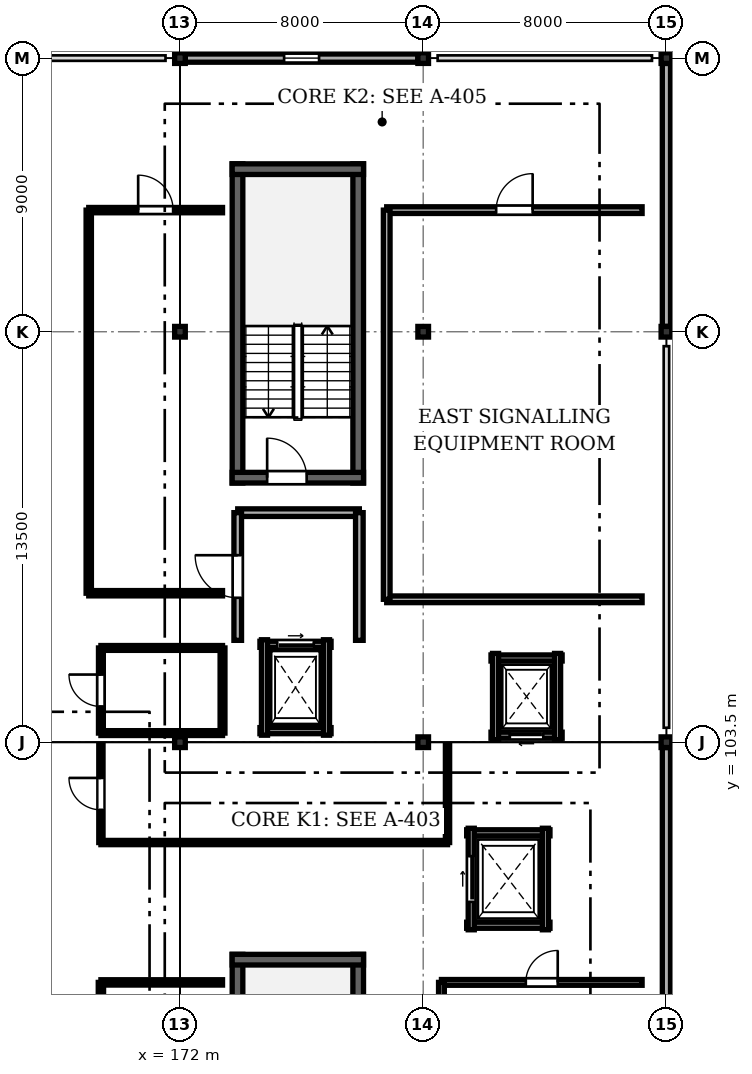
"""IFC4 building model, lengths in metres.
Left out: names, types, materials, properties, quantities, classifications, styles, units other than length and angle.
Written with IfcOpenShell. Run it as: python <this file> out.ifc"""

import sys

from ifc_helpers import new_model, si_unit, direction, frame, frame_2d, origin, origin_2d, place, context, subcontext, project, spatial, rectangle, i_section, extrude, element, fill, save


model = new_model("IFC4")
c1 = context("Model", 3, precision=1e-05, world=origin(), true_north=direction((0.0, 1.0)))
c2 = subcontext(c1, "Body", "Model", "MODEL_VIEW")
j1 = project(units=[si_unit("LENGTHUNIT", "METRE"), si_unit("PLANEANGLEUNIT", "RADIAN")], contexts=[c1])
p1 = place(None, origin())
s1 = spatial("IfcSite", under=j1, at=p1, CompositionType="ELEMENT")
p2 = place(p1, origin())
s2 = spatial("IfcBuilding", under=s1, at=p2, CompositionType="ELEMENT")
p3 = place(p2, frame((0.0, 0.0, 17.6)))
s3 = spatial("IfcBuildingStorey", under=s2, at=p3, CompositionType="ELEMENT", Elevation=17.6)
for number, where, z_axis, x_axis in (
    (1, (172.0, 103.5, 0.0), (0.0, 0.0, 1.0), (1.0, 0.0, 0.0)),
    (2, (172.0, 117.0, 0.0), (0.0, 0.0, 1.0), (1.0, 0.0, 0.0)),
    (3, (172.0, 126.0, 0.0), (0.0, 0.0, 1.0), (1.0, 0.0, 0.0)),
    (4, (180.0, 103.5, 0.0), (0.0, 0.0, 1.0), (1.0, 0.0, 0.0)),
    (5, (180.0, 117.0, 0.0), (0.0, 0.0, 1.0), (1.0, 0.0, 0.0)),
    (6, (180.0, 126.0, 0.0), (0.0, 0.0, 1.0), (1.0, 0.0, 0.0)),
    (7, (188.0, 103.5, 0.0), (0.0, 0.0, 1.0), (1.0, 0.0, 0.0)),
    (8, (188.0, 117.0, 0.0), (0.0, 0.0, 1.0), (1.0, 0.0, 0.0)),
    (9, (188.0, 126.0, 0.0), (0.0, 0.0, 1.0), (1.0, 0.0, 0.0)),
):
    element("IfcColumn", number, at=place(p3, frame(where, z_axis=z_axis, x_axis=x_axis)), inside=s3, PredefinedType="COLUMN", context=c2, shape_type="SweptSolid", body=[
        extrude(i_section(OverallWidth=0.35, OverallDepth=0.35, WebThickness=0.012, FlangeThickness=0.019, FilletRadius=0.02, at=origin_2d()), origin(), (0.0, 0.0, 1.0), 3.2),
    ])
p4 = place(p3, frame((172.175, 126.0, 0.0), z_axis=(0.0, 0.0, 1.0), x_axis=(1.0, 0.0, 0.0)))
e10 = element("IfcWall", 10, at=p4, inside=s3, PredefinedType="SOLIDWALL", context=c2, shape_type="SweptSolid", body=[
    extrude(rectangle(XDim=7.65, YDim=0.27, at=frame_2d((3.825, 0.0))), origin(), (0.0, 0.0, 1.0), 2.495),
])
p5 = place(p4, frame((3.25, 0.0, 0.9)))
e11 = element("IfcOpeningElement", 11, at=p5, cuts=e10, PredefinedType="OPENING", context=c2, shape_type="SweptSolid", body=[
    extrude(rectangle(XDim=1.15, YDim=1.45, at=frame_2d((0.575, 0.725))), frame((0.0, 0.145, 0.0), z_axis=(0.0, -1.0, 0.0), x_axis=(1.0, 0.0, 0.0)), (0.0, 0.0, 1.0), 0.29),
])
for number, where, z_axis, x_axis in (
    (12, (188.0, 103.325, 0.0), (0.0, 0.0, 1.0), (0.0, -1.0, 0.0)),
    (13, (188.0, 125.825, 0.0), (0.0, 0.0, 1.0), (0.0, -1.0, 0.0)),
):
    element("IfcWall", number, at=place(p3, frame(where, z_axis=z_axis, x_axis=x_axis)), inside=s3, PredefinedType="SOLIDWALL", context=c2, shape_type="SweptSolid", body=[
        extrude(rectangle(XDim=8.65, YDim=0.27, at=frame_2d((4.325, 0.0))), origin(), (0.0, 0.0, 1.0), 2.375),
    ])
for number, where, z_axis, x_axis in (
    (14, (177.863, 86.025, 0.0), (0.0, 0.0, 1.0), (0.0, 1.0, 0.0)),
    (15, (173.893, 96.522, 0.0), (0.0, 0.0, 1.0), (0.0, -1.0, 0.0)),
):
    element("IfcWall", number, at=place(p3, frame(where, z_axis=z_axis, x_axis=x_axis)), inside=s3, PredefinedType="SHEAR", context=c2, shape_type="SweptSolid", body=[
        extrude(rectangle(XDim=10.498, YDim=0.35, at=frame_2d((5.249, 0.0))), origin(), (0.0, 0.0, 1.0), 2.98),
    ])
p6 = place(p3, frame((178.038, 96.347, 0.0), z_axis=(0.0, 0.0, 1.0), x_axis=(-1.0, 0.0, 0.0)))
e16 = element("IfcWall", 16, at=p6, inside=s3, PredefinedType="SHEAR", context=c2, shape_type="SweptSolid", body=[
    extrude(rectangle(XDim=4.32, YDim=0.35, at=frame_2d((2.16, 0.0))), origin(), (0.0, 0.0, 1.0), 2.98),
])
for number, where, z_axis, x_axis in (
    (17, (177.863, 112.025, 0.0), (0.0, 0.0, 1.0), (0.0, 1.0, 0.0)),
    (18, (173.893, 122.522, 0.0), (0.0, 0.0, 1.0), (0.0, -1.0, 0.0)),
):
    element("IfcWall", number, at=place(p3, frame(where, z_axis=z_axis, x_axis=x_axis)), inside=s3, PredefinedType="SHEAR", context=c2, shape_type="SweptSolid", body=[
        extrude(rectangle(XDim=10.498, YDim=0.35, at=frame_2d((5.249, 0.0))), origin(), (0.0, 0.0, 1.0), 2.98),
    ])
p7 = place(p3, frame((178.038, 122.347, 0.0), z_axis=(0.0, 0.0, 1.0), x_axis=(-1.0, 0.0, 0.0)))
e19 = element("IfcWall", 19, at=p7, inside=s3, PredefinedType="SHEAR", context=c2, shape_type="SweptSolid", body=[
    extrude(rectangle(XDim=4.32, YDim=0.35, at=frame_2d((2.16, 0.0))), origin(), (0.0, 0.0, 1.0), 2.98),
])
p8 = place(p3, frame((173.718, 112.2, 0.0), z_axis=(0.0, 0.0, 1.0), x_axis=(1.0, 0.0, 0.0)))
e20 = element("IfcWall", 20, at=p8, inside=s3, PredefinedType="SHEAR", context=c2, shape_type="SweptSolid", body=[
    extrude(rectangle(XDim=4.32, YDim=0.35, at=frame_2d((2.16, 0.0))), origin(), (0.0, 0.0, 1.0), 2.98),
])
p9 = place(p8, frame((1.15, 0.0, 0.0)))
e21 = element("IfcOpeningElement", 21, at=p9, cuts=e20, PredefinedType="OPENING", context=c2, shape_type="SweptSolid", body=[
    extrude(rectangle(XDim=1.3, YDim=2.1, at=frame_2d((0.65, 1.05))), frame((0.0, 0.185, 0.0), z_axis=(0.0, -1.0, 0.0), x_axis=(1.0, 0.0, 0.0)), (0.0, 0.0, 1.0), 0.37),
])
p10 = place(p3, frame((174.63, 103.88, 0.0), z_axis=(0.0, 0.0, 1.0), x_axis=(1.0, 0.0, 0.0)))
e22 = element("IfcWall", 22, at=p10, inside=s3, PredefinedType="SOLIDWALL", context=c2, shape_type="SweptSolid", body=[
    extrude(rectangle(XDim=2.34, YDim=0.2, at=frame_2d((1.17, 0.0))), origin(), (0.0, 0.0, 1.0), 2.515),
])
p11 = place(p3, frame((176.97, 106.72, 0.0), z_axis=(0.0, 0.0, 1.0), x_axis=(-1.0, 0.0, 0.0)))
e23 = element("IfcWall", 23, at=p11, inside=s3, PredefinedType="SOLIDWALL", context=c2, shape_type="SweptSolid", body=[
    extrude(rectangle(XDim=2.34, YDim=0.2, at=frame_2d((1.17, 0.0))), origin(), (0.0, 0.0, 1.0), 2.955),
])
p12 = place(p11, frame((0.57, 0.0, 0.0)))
e24 = element("IfcOpeningElement", 24, at=p12, cuts=e23, PredefinedType="OPENING", context=c2, shape_type="SweptSolid", body=[
    extrude(rectangle(XDim=1.2, YDim=2.15, at=frame_2d((0.6, 1.075))), frame((0.0, 0.11, 0.0), z_axis=(0.0, -1.0, 0.0), x_axis=(1.0, 0.0, 0.0)), (0.0, 0.0, 1.0), 0.22),
])
for number, where, z_axis, x_axis in (
    (25, (174.78, 106.87, 0.0), (0.0, 0.0, 1.0), (0.0, -1.0, 0.0)),
    (26, (176.82, 103.73, 0.0), (0.0, 0.0, 1.0), (0.0, 1.0, 0.0)),
):
    element("IfcWall", number, at=place(p3, frame(where, z_axis=z_axis, x_axis=x_axis)), inside=s3, PredefinedType="SOLIDWALL", context=c2, shape_type="SweptSolid", body=[
        extrude(rectangle(XDim=3.14, YDim=0.2, at=frame_2d((1.57, 0.0))), origin(), (0.0, 0.0, 1.0), 2.515),
    ])
p13 = place(p3, frame((182.23, 103.73, 0.0), z_axis=(0.0, 0.0, 1.0), x_axis=(1.0, 0.0, 0.0)))
e27 = element("IfcWall", 27, at=p13, inside=s3, PredefinedType="SOLIDWALL", context=c2, shape_type="SweptSolid", body=[
    extrude(rectangle(XDim=2.34, YDim=0.2, at=frame_2d((1.17, 0.0))), origin(), (0.0, 0.0, 1.0), 2.515),
])
p14 = place(p13, frame((0.62, 0.0, 0.0)))
e28 = element("IfcOpeningElement", 28, at=p14, cuts=e27, PredefinedType="OPENING", context=c2, shape_type="SweptSolid", body=[
    extrude(rectangle(XDim=1.1, YDim=2.15, at=frame_2d((0.55, 1.075))), frame((0.0, 0.11, 0.0), z_axis=(0.0, -1.0, 0.0), x_axis=(1.0, 0.0, 0.0)), (0.0, 0.0, 1.0), 0.22),
])
p15 = place(p3, frame((184.57, 106.27, 0.0), z_axis=(0.0, 0.0, 1.0), x_axis=(-1.0, 0.0, 0.0)))
e29 = element("IfcWall", 29, at=p15, inside=s3, PredefinedType="SOLIDWALL", context=c2, shape_type="SweptSolid", body=[
    extrude(rectangle(XDim=2.34, YDim=0.2, at=frame_2d((1.17, 0.0))), origin(), (0.0, 0.0, 1.0), 2.955),
])
for number, where, z_axis, x_axis in (
    (30, (182.38, 106.42, 0.0), (0.0, 0.0, 1.0), (0.0, -1.0, 0.0)),
    (31, (184.42, 103.58, 0.0), (0.0, 0.0, 1.0), (0.0, 1.0, 0.0)),
):
    element("IfcWall", number, at=place(p3, frame(where, z_axis=z_axis, x_axis=x_axis)), inside=s3, PredefinedType="SOLIDWALL", context=c2, shape_type="SweptSolid", body=[
        extrude(rectangle(XDim=2.84, YDim=0.2, at=frame_2d((1.42, 0.0))), origin(), (0.0, 0.0, 1.0), 2.515),
    ])
for number, where, z_axis, x_axis in (
    (32, (181.43, 97.48, 0.0), (0.0, 0.0, 1.0), (1.0, 0.0, 0.0)),
    (33, (184.17, 100.52, 0.0), (0.0, 0.0, 1.0), (-1.0, 0.0, 0.0)),
):
    element("IfcWall", number, at=place(p3, frame(where, z_axis=z_axis, x_axis=x_axis)), inside=s3, PredefinedType="SOLIDWALL", context=c2, shape_type="SweptSolid", body=[
        extrude(rectangle(XDim=2.74, YDim=0.2, at=frame_2d((1.37, 0.0))), origin(), (0.0, 0.0, 1.0), 2.955),
    ])
p16 = place(p3, frame((181.58, 100.67, 0.0), z_axis=(0.0, 0.0, 1.0), x_axis=(0.0, -1.0, 0.0)))
e34 = element("IfcWall", 34, at=p16, inside=s3, PredefinedType="SOLIDWALL", context=c2, shape_type="SweptSolid", body=[
    extrude(rectangle(XDim=3.34, YDim=0.2, at=frame_2d((1.67, 0.0))), origin(), (0.0, 0.0, 1.0), 2.955),
])
p17 = place(p16, frame((0.92, 0.0, 0.0)))
e35 = element("IfcOpeningElement", 35, at=p17, cuts=e34, PredefinedType="OPENING", context=c2, shape_type="SweptSolid", body=[
    extrude(rectangle(XDim=1.5, YDim=2.2, at=frame_2d((0.75, 1.1))), frame((0.0, 0.11, 0.0), z_axis=(0.0, -1.0, 0.0), x_axis=(1.0, 0.0, 0.0)), (0.0, 0.0, 1.0), 0.22),
])
p18 = place(p3, frame((184.02, 97.33, 0.0), z_axis=(0.0, 0.0, 1.0), x_axis=(0.0, 1.0, 0.0)))
e36 = element("IfcWall", 36, at=p18, inside=s3, PredefinedType="SOLIDWALL", context=c2, shape_type="SweptSolid", body=[
    extrude(rectangle(XDim=3.34, YDim=0.2, at=frame_2d((1.67, 0.0))), origin(), (0.0, 0.0, 1.0), 2.955),
])
p19 = place(p3, frame((180.8, 100.2, 0.0), z_axis=(0.0, 0.0, 1.0), x_axis=(-1.0, 0.0, 0.0)))
e37 = element("IfcWall", 37, at=p19, inside=s3, PredefinedType="PARTITIONING", context=c2, shape_type="SweptSolid", body=[
    extrude(rectangle(XDim=11.4, YDim=0.14, at=frame_2d((5.7, 0.0))), origin(), (0.0, 0.0, 1.0), 2.565),
])
p20 = place(p3, frame((169.4, 100.2, 0.0), z_axis=(0.0, 0.0, 1.0), x_axis=(0.0, 1.0, 0.0)))
e38 = element("IfcWall", 38, at=p20, inside=s3, PredefinedType="PARTITIONING", context=c2, shape_type="SweptSolid", body=[
    extrude(rectangle(XDim=3.2, YDim=0.14, at=frame_2d((1.6, 0.0))), origin(), (0.0, 0.0, 1.0), 2.515),
])
p21 = place(p20, frame((1.075, 0.0, 0.0)))
e39 = element("IfcOpeningElement", 39, at=p21, cuts=e38, PredefinedType="OPENING", context=c2, shape_type="SweptSolid", body=[
    extrude(rectangle(XDim=1.05, YDim=2.1, at=frame_2d((0.525, 1.05))), frame((0.0, 0.08, 0.0), z_axis=(0.0, -1.0, 0.0), x_axis=(1.0, 0.0, 0.0)), (0.0, 0.0, 1.0), 0.16),
])
p22 = place(p3, frame((180.8, 103.4, 0.0), z_axis=(0.0, 0.0, 1.0), x_axis=(0.0, -1.0, 0.0)))
e40 = element("IfcWall", 40, at=p22, inside=s3, PredefinedType="PARTITIONING", context=c2, shape_type="SweptSolid", body=[
    extrude(rectangle(XDim=3.2, YDim=0.14, at=frame_2d((1.6, 0.0))), origin(), (0.0, 0.0, 1.0), 2.355),
])
p23 = place(p3, frame((180.6, 95.6, 0.0), z_axis=(0.0, 0.0, 1.0), x_axis=(1.0, 0.0, 0.0)))
e41 = element("IfcWall", 41, at=p23, inside=s3, PredefinedType="PARTITIONING", context=c2, shape_type="SweptSolid", body=[
    extrude(rectangle(XDim=6.6, YDim=0.19, at=frame_2d((3.3, 0.0))), origin(), (0.0, 0.0, 1.0), 2.495),
])
p24 = place(p23, frame((2.775, 0.0, 0.0)))
e42 = element("IfcOpeningElement", 42, at=p24, cuts=e41, PredefinedType="OPENING", context=c2, shape_type="SweptSolid", body=[
    extrude(rectangle(XDim=1.05, YDim=2.1, at=frame_2d((0.525, 1.05))), frame((0.0, 0.105, 0.0), z_axis=(0.0, -1.0, 0.0), x_axis=(1.0, 0.0, 0.0)), (0.0, 0.0, 1.0), 0.21),
])
p25 = place(p3, frame((180.6, 86.4, 0.0), z_axis=(0.0, 0.0, 1.0), x_axis=(0.0, 1.0, 0.0)))
e43 = element("IfcWall", 43, at=p25, inside=s3, PredefinedType="PARTITIONING", context=c2, shape_type="SweptSolid", body=[
    extrude(rectangle(XDim=9.2, YDim=0.19, at=frame_2d((4.6, 0.0))), origin(), (0.0, 0.0, 1.0), 2.515),
])
p26 = place(p3, frame((169.4, 95.6, 0.0), z_axis=(0.0, 0.0, 1.0), x_axis=(1.0, 0.0, 0.0)))
e44 = element("IfcWall", 44, at=p26, inside=s3, PredefinedType="PARTITIONING", context=c2, shape_type="SweptSolid", body=[
    extrude(rectangle(XDim=4.0, YDim=0.175, at=frame_2d((2.0, 0.0))), origin(), (0.0, 0.0, 1.0), 2.565),
])
p27 = place(p3, frame((169.4, 84.4, 0.0), z_axis=(0.0, 0.0, 1.0), x_axis=(0.0, 1.0, 0.0)))
e45 = element("IfcWall", 45, at=p27, inside=s3, PredefinedType="PARTITIONING", context=c2, shape_type="SweptSolid", body=[
    extrude(rectangle(XDim=11.2, YDim=0.175, at=frame_2d((5.6, 0.0))), origin(), (0.0, 0.0, 1.0), 2.515),
])
p28 = place(p27, frame((5.075, 0.0, 0.0)))
e46 = element("IfcOpeningElement", 46, at=p28, cuts=e45, PredefinedType="OPENING", context=c2, shape_type="SweptSolid", body=[
    extrude(rectangle(XDim=1.05, YDim=2.1, at=frame_2d((0.525, 1.05))), frame((0.0, 0.097, 0.0), z_axis=(0.0, -1.0, 0.0), x_axis=(1.0, 0.0, 0.0)), (0.0, 0.0, 1.0), 0.195),
])
for number, where, z_axis, x_axis in (
    (47, (173.4, 103.8, 0.0), (0.0, 0.0, 1.0), (-1.0, 0.0, 0.0)),
    (48, (169.4, 106.6, 0.0), (0.0, 0.0, 1.0), (1.0, 0.0, 0.0)),
):
    element("IfcWall", number, at=place(p3, frame(where, z_axis=z_axis, x_axis=x_axis)), inside=s3, PredefinedType="PARTITIONING", context=c2, shape_type="SweptSolid", body=[
        extrude(rectangle(XDim=4.0, YDim=0.16, at=frame_2d((2.0, 0.0))), origin(), (0.0, 0.0, 1.0), 2.355),
    ])
p29 = place(p3, frame((169.4, 103.8, 0.0), z_axis=(0.0, 0.0, 1.0), x_axis=(0.0, 1.0, 0.0)))
e49 = element("IfcWall", 49, at=p29, inside=s3, PredefinedType="PARTITIONING", context=c2, shape_type="SweptSolid", body=[
    extrude(rectangle(XDim=2.8, YDim=0.16, at=frame_2d((1.4, 0.0))), origin(), (0.0, 0.0, 1.0), 2.515),
])
p30 = place(p29, frame((0.875, 0.0, 0.0)))
e50 = element("IfcOpeningElement", 50, at=p30, cuts=e49, PredefinedType="OPENING", context=c2, shape_type="SweptSolid", body=[
    extrude(rectangle(XDim=1.05, YDim=2.1, at=frame_2d((0.525, 1.05))), frame((0.0, 0.09, 0.0), z_axis=(0.0, -1.0, 0.0), x_axis=(1.0, 0.0, 0.0)), (0.0, 0.0, 1.0), 0.18),
])
p31 = place(p3, frame((173.4, 106.6, 0.0), z_axis=(0.0, 0.0, 1.0), x_axis=(0.0, -1.0, 0.0)))
e51 = element("IfcWall", 51, at=p31, inside=s3, PredefinedType="PARTITIONING", context=c2, shape_type="SweptSolid", body=[
    extrude(rectangle(XDim=2.8, YDim=0.16, at=frame_2d((1.4, 0.0))), origin(), (0.0, 0.0, 1.0), 2.515),
])
p32 = place(p3, frame((187.2, 108.2, 0.0), z_axis=(0.0, 0.0, 1.0), x_axis=(-1.0, 0.0, 0.0)))
e52 = element("IfcWall", 52, at=p32, inside=s3, PredefinedType="SOLIDWALL", context=c2, shape_type="SweptSolid", body=[
    extrude(rectangle(XDim=8.4, YDim=0.22, at=frame_2d((4.2, 0.0))), origin(), (0.0, 0.0, 1.0), 2.355),
])
p33 = place(p3, frame((178.8, 121.0, 0.0), z_axis=(0.0, 0.0, 1.0), x_axis=(1.0, 0.0, 0.0)))
e53 = element("IfcWall", 53, at=p33, inside=s3, PredefinedType="SOLIDWALL", context=c2, shape_type="SweptSolid", body=[
    extrude(rectangle(XDim=8.4, YDim=0.22, at=frame_2d((4.2, 0.0))), origin(), (0.0, 0.0, 1.0), 2.495),
])
p34 = place(p33, frame((3.6, 0.0, 0.0)))
e54 = element("IfcOpeningElement", 54, at=p34, cuts=e53, PredefinedType="OPENING", context=c2, shape_type="SweptSolid", body=[
    extrude(rectangle(XDim=1.2, YDim=2.1, at=frame_2d((0.6, 1.05))), frame((0.0, 0.12, 0.0), z_axis=(0.0, -1.0, 0.0), x_axis=(1.0, 0.0, 0.0)), (0.0, 0.0, 1.0), 0.24),
])
p35 = place(p3, frame((178.8, 108.2, 0.0), z_axis=(0.0, 0.0, 1.0), x_axis=(0.0, 1.0, 0.0)))
e55 = element("IfcWall", 55, at=p35, inside=s3, PredefinedType="SOLIDWALL", context=c2, shape_type="SweptSolid", body=[
    extrude(rectangle(XDim=12.8, YDim=0.22, at=frame_2d((6.4, 0.0))), origin(), (0.0, 0.0, 1.0), 2.955),
])
p36 = place(p3, frame((173.4, 108.4, 0.0), z_axis=(0.0, 0.0, 1.0), x_axis=(-1.0, 0.0, 0.0)))
e56 = element("IfcWall", 56, at=p36, inside=s3, PredefinedType="PARTITIONING", context=c2, shape_type="SweptSolid", body=[
    extrude(rectangle(XDim=4.4, YDim=0.175, at=frame_2d((2.2, 0.0))), origin(), (0.0, 0.0, 1.0), 2.355),
])
p37 = place(p3, frame((169.0, 121.0, 0.0), z_axis=(0.0, 0.0, 1.0), x_axis=(1.0, 0.0, 0.0)))
e57 = element("IfcWall", 57, at=p37, inside=s3, PredefinedType="PARTITIONING", context=c2, shape_type="SweptSolid", body=[
    extrude(rectangle(XDim=4.4, YDim=0.175, at=frame_2d((2.2, 0.0))), origin(), (0.0, 0.0, 1.0), 2.565),
])
p38 = place(p37, frame((1.625, 0.0, 0.0)))
e58 = element("IfcOpeningElement", 58, at=p38, cuts=e57, PredefinedType="OPENING", context=c2, shape_type="SweptSolid", body=[
    extrude(rectangle(XDim=1.15, YDim=2.1, at=frame_2d((0.575, 1.05))), frame((0.0, 0.097, 0.0), z_axis=(0.0, -1.0, 0.0), x_axis=(1.0, 0.0, 0.0)), (0.0, 0.0, 1.0), 0.195),
])
p39 = place(p3, frame((169.0, 108.4, 0.0), z_axis=(0.0, 0.0, 1.0), x_axis=(0.0, 1.0, 0.0)))
e59 = element("IfcWall", 59, at=p39, inside=s3, PredefinedType="PARTITIONING", context=c2, shape_type="SweptSolid", body=[
    extrude(rectangle(XDim=12.6, YDim=0.175, at=frame_2d((6.3, 0.0))), origin(), (0.0, 0.0, 1.0), 2.515),
])
p40 = place(p3, frame((173.9, 111.05, 0.0), z_axis=(0.0, 0.0, 1.0), x_axis=(1.0, 0.0, 0.0)))
e60 = element("IfcWall", 60, at=p40, inside=s3, PredefinedType="SOLIDWALL", context=c2, shape_type="SweptSolid", body=[
    extrude(rectangle(XDim=4.0, YDim=0.25, at=frame_2d((2.0, 0.0))), origin(), (0.0, 0.0, 1.0), 2.955),
])
p41 = place(p3, frame((173.9, 106.85, 0.0), z_axis=(0.0, 0.0, 1.0), x_axis=(0.0, 1.0, 0.0)))
e61 = element("IfcWall", 61, at=p41, inside=s3, PredefinedType="SOLIDWALL", context=c2, shape_type="SweptSolid", body=[
    extrude(rectangle(XDim=4.2, YDim=0.25, at=frame_2d((2.1, 0.0))), origin(), (0.0, 0.0, 1.0), 2.955),
])
p42 = place(p41, frame((1.4, 0.0, 0.0)))
e62 = element("IfcOpeningElement", 62, at=p42, cuts=e61, PredefinedType="OPENING", context=c2, shape_type="SweptSolid", body=[
    extrude(rectangle(XDim=1.4, YDim=2.1, at=frame_2d((0.7, 1.05))), frame((0.0, 0.135, 0.0), z_axis=(0.0, -1.0, 0.0), x_axis=(1.0, 0.0, 0.0)), (0.0, 0.0, 1.0), 0.27),
])
p43 = place(p3, frame((177.9, 111.05, 0.0), z_axis=(0.0, 0.0, 1.0), x_axis=(0.0, -1.0, 0.0)))
e63 = element("IfcWall", 63, at=p43, inside=s3, PredefinedType="SOLIDWALL", context=c2, shape_type="SweptSolid", body=[
    extrude(rectangle(XDim=4.2, YDim=0.25, at=frame_2d((2.1, 0.0))), origin(), (0.0, 0.0, 1.0), 2.955),
])
p44 = place(p5, origin())
e64 = element("IfcWindow", 64, at=p44, inside=s3, PartitioningType="SINGLE_PANEL", PredefinedType="WINDOW", context=c2, shape_type="SweptSolid", body=[
    extrude(rectangle(XDim=1.15, YDim=1.45, at=frame_2d((0.575, 0.725))), frame((0.0, 0.03, 0.0), z_axis=(0.0, -1.0, 0.0), x_axis=(1.0, 0.0, 0.0)), (0.0, 0.0, 1.0), 0.06),
])
fill(e11, e64)
p45 = place(p9, origin())
e65 = element("IfcDoor", 65, at=p45, inside=s3, OperationType="SINGLE_SWING_LEFT", PredefinedType="DOOR", context=c2, shape_type="SweptSolid", body=[
    extrude(rectangle(XDim=1.3, YDim=2.1, at=frame_2d((0.65, 1.05))), frame((0.0, 0.025, 0.0), z_axis=(0.0, -1.0, 0.0), x_axis=(1.0, 0.0, 0.0)), (0.0, 0.0, 1.0), 0.05),
])
fill(e21, e65)
p46 = place(p12, origin())
e66 = element("IfcDoor", 66, at=p46, inside=s3, OperationType="SLIDING_TO_LEFT", PredefinedType="DOOR", context=c2, shape_type="SweptSolid", body=[
    extrude(rectangle(XDim=1.2, YDim=2.15, at=frame_2d((0.6, 1.075))), frame((0.0, 0.025, 0.0), z_axis=(0.0, -1.0, 0.0), x_axis=(1.0, 0.0, 0.0)), (0.0, 0.0, 1.0), 0.05),
])
fill(e24, e66)
p47 = place(p14, origin())
e67 = element("IfcDoor", 67, at=p47, inside=s3, OperationType="SLIDING_TO_LEFT", PredefinedType="DOOR", context=c2, shape_type="SweptSolid", body=[
    extrude(rectangle(XDim=1.1, YDim=2.15, at=frame_2d((0.55, 1.075))), frame((0.0, 0.025, 0.0), z_axis=(0.0, -1.0, 0.0), x_axis=(1.0, 0.0, 0.0)), (0.0, 0.0, 1.0), 0.05),
])
fill(e28, e67)
p48 = place(p17, origin())
e68 = element("IfcDoor", 68, at=p48, inside=s3, OperationType="SLIDING_TO_LEFT", PredefinedType="DOOR", context=c2, shape_type="SweptSolid", body=[
    extrude(rectangle(XDim=1.5, YDim=2.2, at=frame_2d((0.75, 1.1))), frame((0.0, 0.025, 0.0), z_axis=(0.0, -1.0, 0.0), x_axis=(1.0, 0.0, 0.0)), (0.0, 0.0, 1.0), 0.05),
])
fill(e35, e68)
p49 = place(p21, origin())
e69 = element("IfcDoor", 69, at=p49, inside=s3, OperationType="SINGLE_SWING_RIGHT", PredefinedType="DOOR", context=c2, shape_type="SweptSolid", body=[
    extrude(rectangle(XDim=1.05, YDim=2.1, at=frame_2d((0.525, 1.05))), frame((0.0, 0.025, 0.0), z_axis=(0.0, -1.0, 0.0), x_axis=(1.0, 0.0, 0.0)), (0.0, 0.0, 1.0), 0.05),
])
fill(e39, e69)
p50 = place(p24, origin())
e70 = element("IfcDoor", 70, at=p50, inside=s3, OperationType="SINGLE_SWING_RIGHT", PredefinedType="DOOR", context=c2, shape_type="SweptSolid", body=[
    extrude(rectangle(XDim=1.05, YDim=2.1, at=frame_2d((0.525, 1.05))), frame((0.0, 0.025, 0.0), z_axis=(0.0, -1.0, 0.0), x_axis=(1.0, 0.0, 0.0)), (0.0, 0.0, 1.0), 0.05),
])
fill(e42, e70)
p51 = place(p30, origin())
e71 = element("IfcDoor", 71, at=p51, inside=s3, OperationType="SINGLE_SWING_RIGHT", PredefinedType="DOOR", context=c2, shape_type="SweptSolid", body=[
    extrude(rectangle(XDim=1.05, YDim=2.1, at=frame_2d((0.525, 1.05))), frame((0.0, 0.025, 0.0), z_axis=(0.0, -1.0, 0.0), x_axis=(1.0, 0.0, 0.0)), (0.0, 0.0, 1.0), 0.05),
])
fill(e50, e71)
p52 = place(p34, origin())
e72 = element("IfcDoor", 72, at=p52, inside=s3, OperationType="SINGLE_SWING_RIGHT", PredefinedType="DOOR", context=c2, shape_type="SweptSolid", body=[
    extrude(rectangle(XDim=1.2, YDim=2.1, at=frame_2d((0.6, 1.05))), frame((0.0, 0.025, 0.0), z_axis=(0.0, -1.0, 0.0), x_axis=(1.0, 0.0, 0.0)), (0.0, 0.0, 1.0), 0.05),
])
fill(e54, e72)
p53 = place(p38, origin())
e73 = element("IfcDoor", 73, at=p53, inside=s3, OperationType="SINGLE_SWING_LEFT", PredefinedType="DOOR", context=c2, shape_type="SweptSolid", body=[
    extrude(rectangle(XDim=1.15, YDim=2.1, at=frame_2d((0.575, 1.05))), frame((0.0, 0.025, 0.0), z_axis=(0.0, -1.0, 0.0), x_axis=(1.0, 0.0, 0.0)), (0.0, 0.0, 1.0), 0.05),
])
fill(e58, e73)
p54 = place(p42, origin())
e74 = element("IfcDoor", 74, at=p54, inside=s3, OperationType="SINGLE_SWING_RIGHT", PredefinedType="DOOR", context=c2, shape_type="SweptSolid", body=[
    extrude(rectangle(XDim=1.4, YDim=2.1, at=frame_2d((0.7, 1.05))), frame((0.0, 0.025, 0.0), z_axis=(0.0, -1.0, 0.0), x_axis=(1.0, 0.0, 0.0)), (0.0, 0.0, 1.0), 0.05),
])
fill(e62, e74)
save(model, sys.argv[1])
